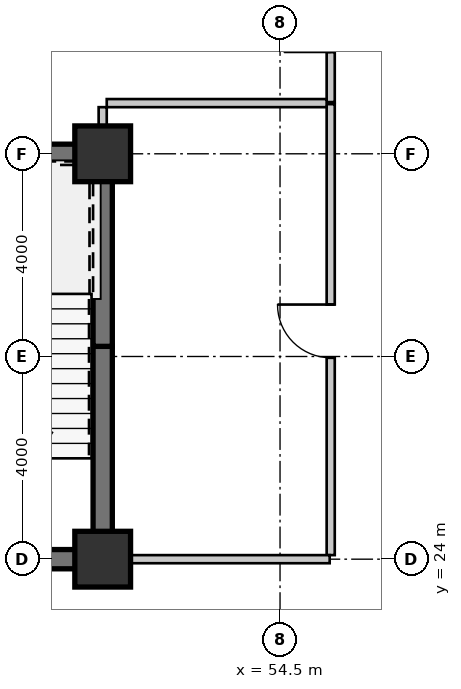
"""IFC4 building model, lengths in metres.
Left out: names, types, materials, properties, quantities, classifications, styles, units other than length and angle.
Written with IfcOpenShell. Run it as: python <this file> out.ifc"""

import sys

from ifc_helpers import new_model, si_unit, direction, frame, frame_2d, origin, origin_2d, place, context, subcontext, project, spatial, rectangle, extrude, source, transform, mapped, element, fill, save


model = new_model("IFC4")
c1 = context("Model", 3, precision=1e-05, world=origin(), true_north=direction((0.0, 1.0)))
c2 = subcontext(c1, "Body", "Model", "MODEL_VIEW")
j1 = project(units=[si_unit("LENGTHUNIT", "METRE"), si_unit("PLANEANGLEUNIT", "RADIAN")], contexts=[c1])
p1 = place(None, origin())
s1 = spatial("IfcSite", under=j1, at=p1, CompositionType="ELEMENT")
p2 = place(p1, origin())
s2 = spatial("IfcBuilding", under=s1, at=p2, CompositionType="ELEMENT")
p3 = place(p2, frame((0.0, 0.0, 12.95)))
s3 = spatial("IfcBuildingStorey", under=s2, at=p3, CompositionType="ELEMENT", Elevation=12.95)
m1 = source(origin(), c2, "Body", "SweptSolid", [
    extrude(rectangle(XDim=1.1, YDim=1.1, at=origin_2d()), origin(), (0.0, 0.0, 1.0), 3.85),
])
for number, where, z_axis, x_axis in (
    (1, (51.0, 24.0, 0.0), (0.0, 0.0, 1.0), (1.0, 0.0, 0.0)),
    (2, (51.0, 32.0, 0.0), (0.0, 0.0, 1.0), (1.0, 0.0, 0.0)),
):
    element("IfcColumn", number, at=place(p3, frame(where, z_axis=z_axis, x_axis=x_axis)), inside=s3, PredefinedType="COLUMN", context=c2, shape_type="MappedRepresentation", body=[
        mapped(m1, transform((0.0, 0.0, 0.0), scale=1.0)),
    ])
m2 = source(origin(), c2, "Body", "SweptSolid", [
    extrude(rectangle(XDim=11.99, YDim=0.38, at=frame_2d((5.995, 0.0))), origin(), (0.0, 0.0, 1.0), 3.43),
])
p4 = place(p3, frame((39.2, 32.0, 0.0), z_axis=(0.0, 0.0, 1.0), x_axis=(1.0, 0.0, 0.0)))
e3 = element("IfcWall", 3, at=p4, inside=s3, PredefinedType="SHEAR", context=c2, shape_type="MappedRepresentation", body=[
    mapped(m2, transform((0.0, 0.0, 0.0), scale=1.0)),
])
m3 = source(origin(), c2, "Body", "SweptSolid", [
    extrude(rectangle(XDim=4.01, YDim=0.38, at=frame_2d((2.005, 0.0))), origin(), (0.0, 0.0, 1.0), 3.43),
])
p5 = place(p3, frame((51.0, 24.19, 0.0), z_axis=(0.0, 0.0, 1.0), x_axis=(0.0, 1.0, 0.0)))
e4 = element("IfcWall", 4, at=p5, inside=s3, PredefinedType="SHEAR", context=c2, shape_type="MappedRepresentation", body=[
    mapped(m3, transform((0.0, 0.0, 0.0), scale=1.0)),
])
m4 = source(origin(), c2, "Body", "SweptSolid", [
    extrude(rectangle(XDim=3.61, YDim=0.38, at=frame_2d((1.805, 0.0))), origin(), (0.0, 0.0, 1.0), 3.43),
])
p6 = place(p3, frame((51.0, 28.2, 0.0), z_axis=(0.0, 0.0, 1.0), x_axis=(0.0, 1.0, 0.0)))
e5 = element("IfcWall", 5, at=p6, inside=s3, PredefinedType="SHEAR", context=c2, shape_type="MappedRepresentation", body=[
    mapped(m4, transform((0.0, 0.0, 0.0), scale=1.0)),
])
m5 = source(origin(), c2, "Body", "SweptSolid", [
    extrude(rectangle(XDim=4.98, YDim=0.38, at=frame_2d((2.49, 0.0))), origin(), (0.0, 0.0, 1.0), 3.43),
])
p7 = place(p3, frame((46.21, 24.0, 0.0), z_axis=(0.0, 0.0, 1.0), x_axis=(1.0, 0.0, 0.0)))
e6 = element("IfcWall", 6, at=p7, inside=s3, PredefinedType="SHEAR", context=c2, shape_type="MappedRepresentation", body=[
    mapped(m5, transform((0.0, 0.0, 0.0), scale=1.0)),
])
m6 = source(origin(), c2, "Body", "SweptSolid", [
    extrude(rectangle(XDim=8.9, YDim=0.16, at=frame_2d((4.45, 0.0))), origin(), (0.0, 0.0, 1.0), 3.43),
])
p8 = place(p3, frame((55.5, 24.08, 0.0), z_axis=(0.0, 0.0, 1.0), x_axis=(0.0, 1.0, 0.0)))
e7 = element("IfcWall", 7, at=p8, inside=s3, PredefinedType="PARTITIONING", context=c2, shape_type="MappedRepresentation", body=[
    mapped(m6, transform((0.0, 0.0, 0.0), scale=1.0)),
])
m7 = source(origin(), c2, "Body", "SweptSolid", [
    extrude(rectangle(XDim=1.05, YDim=2.1, at=frame_2d((0.525, 1.05))), frame((0.0, 0.09, 0.0), z_axis=(0.0, -1.0, 0.0), x_axis=(1.0, 0.0, 0.0)), (0.0, 0.0, 1.0), 0.18),
])
p9 = place(p8, frame((3.895, 0.0, 0.0)))
e8 = element("IfcOpeningElement", 8, at=p9, cuts=e7, PredefinedType="OPENING", context=c2, shape_type="MappedRepresentation", body=[
    mapped(m7, transform((0.0, 0.0, 0.0), scale=1.0)),
])
m8 = source(origin(), c2, "Body", "SweptSolid", [
    extrude(rectangle(XDim=4.29, YDim=0.16, at=frame_2d((2.145, 0.0))), origin(), (0.0, 0.0, 1.0), 3.43),
])
p10 = place(p3, frame((51.19, 24.0, 0.0), z_axis=(0.0, 0.0, 1.0), x_axis=(1.0, 0.0, 0.0)))
e9 = element("IfcWall", 9, at=p10, inside=s3, PredefinedType="PARTITIONING", context=c2, shape_type="MappedRepresentation", body=[
    mapped(m8, transform((0.0, 0.0, 0.0), scale=1.0)),
])
m9 = source(origin(), c2, "Body", "SweptSolid", [
    extrude(rectangle(XDim=2.9, YDim=0.16, at=frame_2d((1.45, 0.0))), origin(), (0.0, 0.0, 1.0), 3.43),
])
p11 = place(p3, frame((55.5, 33.02, 0.0), z_axis=(0.0, 0.0, 1.0), x_axis=(0.0, 1.0, 0.0)))
e10 = element("IfcWall", 10, at=p11, inside=s3, PredefinedType="PARTITIONING", context=c2, shape_type="MappedRepresentation", body=[
    mapped(m9, transform((0.0, 0.0, 0.0), scale=1.0)),
])
m10 = source(origin(), c2, "Body", "SweptSolid", [
    extrude(rectangle(XDim=0.92, YDim=2.1, at=frame_2d((0.46, 1.05))), frame((0.0, 0.09, 0.0), z_axis=(0.0, -1.0, 0.0), x_axis=(1.0, 0.0, 0.0)), (0.0, 0.0, 1.0), 0.18),
])
p12 = place(p11, frame((0.99, 0.0, 0.0)))
e11 = element("IfcOpeningElement", 11, at=p12, cuts=e10, PredefinedType="OPENING", context=c2, shape_type="MappedRepresentation", body=[
    mapped(m10, transform((0.0, 0.0, 0.0), scale=1.0)),
])
m11 = source(origin(), c2, "Body", "SweptSolid", [
    extrude(rectangle(XDim=4.34, YDim=0.16, at=frame_2d((2.17, 0.0))), origin(), (0.0, 0.0, 1.0), 3.43),
])
p13 = place(p3, frame((51.08, 33.0, 0.0), z_axis=(0.0, 0.0, 1.0), x_axis=(1.0, 0.0, 0.0)))
e12 = element("IfcWall", 12, at=p13, inside=s3, PredefinedType="PARTITIONING", context=c2, shape_type="MappedRepresentation", body=[
    mapped(m11, transform((0.0, 0.0, 0.0), scale=1.0)),
])
m12 = source(origin(), c2, "Body", "SweptSolid", [
    extrude(rectangle(XDim=0.73, YDim=0.16, at=frame_2d((0.365, 0.0))), origin(), (0.0, 0.0, 1.0), 3.43),
])
p14 = place(p3, frame((51.0, 32.19, 0.0), z_axis=(0.0, 0.0, 1.0), x_axis=(0.0, 1.0, 0.0)))
e13 = element("IfcWall", 13, at=p14, inside=s3, PredefinedType="PARTITIONING", context=c2, shape_type="MappedRepresentation", body=[
    mapped(m12, transform((0.0, 0.0, 0.0), scale=1.0)),
])
m13 = source(origin(), c2, "Body", "SweptSolid", [
    extrude(rectangle(XDim=1.05, YDim=2.1, at=frame_2d((0.525, 1.05))), frame((0.0, 0.025, 0.0), z_axis=(0.0, -1.0, 0.0), x_axis=(1.0, 0.0, 0.0)), (0.0, 0.0, 1.0), 0.05),
])
p15 = place(p9, origin())
e14 = element("IfcDoor", 14, at=p15, inside=s3, OperationType="SINGLE_SWING_RIGHT", PredefinedType="DOOR", context=c2, shape_type="MappedRepresentation", body=[
    mapped(m13, transform((0.0, 0.0, 0.0), scale=1.0)),
])
fill(e8, e14)
save(model, sys.argv[1])
